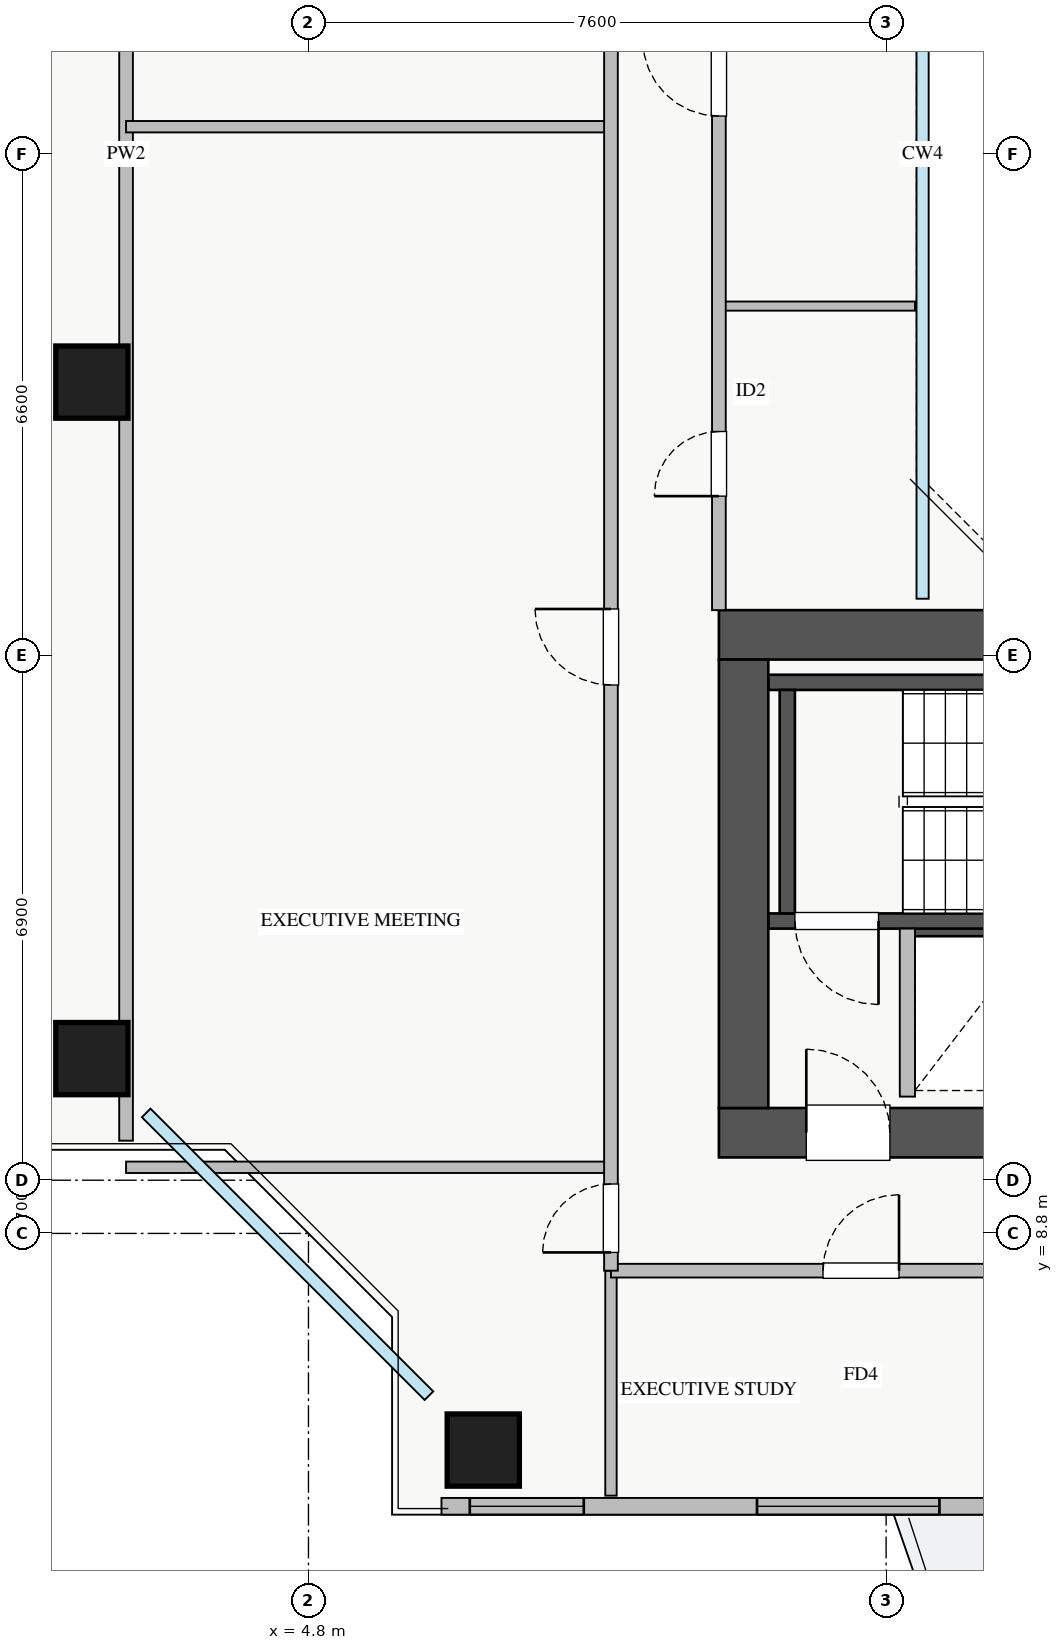
"""IFC4 building model, lengths in metres.
Left out: names, types, materials, properties, quantities, classifications, styles, units other than length and angle.
Written with IfcOpenShell. Run it as: python <this file> out.ifc"""

import sys

from ifc_helpers import new_model, si_unit, direction, frame, frame_2d, origin, origin_2d, place, context, subcontext, project, spatial, rectangle, extrude, source, transform, mapped, element, fill, save


model = new_model("IFC4")
c1 = context("Model", 3, precision=1e-05, world=origin(), true_north=direction((0.0, 1.0)))
c2 = subcontext(c1, "Body", "Model", "MODEL_VIEW")
j1 = project(units=[si_unit("LENGTHUNIT", "METRE"), si_unit("PLANEANGLEUNIT", "RADIAN")], contexts=[c1])
p1 = place(None, origin())
s1 = spatial("IfcSite", under=j1, at=p1, CompositionType="ELEMENT")
p2 = place(p1, origin())
s2 = spatial("IfcBuilding", under=s1, at=p2, CompositionType="ELEMENT")
p3 = place(p2, frame((0.0, 0.0, 176.25)))
s3 = spatial("IfcBuildingStorey", under=s2, at=p3, CompositionType="ELEMENT", Elevation=176.25)
p4 = place(p3, frame((12.68, 12.8, 0.0), z_axis=(0.0, 0.0, 1.0), x_axis=(1.0, 0.0, 0.0)))
e1 = element("IfcWall", 1, at=p4, inside=s3, PredefinedType="SHEAR", context=c2, shape_type="SweptSolid", body=[
    extrude(rectangle(XDim=1.94, YDim=0.18, at=frame_2d((0.97, 0.0))), origin(), (0.0, 0.0, 1.0), 3.07),
])
p5 = place(p3, frame((10.85, 12.91, 0.0), z_axis=(0.0, 0.0, 1.0), x_axis=(1.0, 0.0, 0.0)))
e2 = element("IfcWall", 2, at=p5, inside=s3, PredefinedType="SHEAR", context=c2, shape_type="SweptSolid", body=[
    extrude(rectangle(XDim=7.3, YDim=0.2, at=frame_2d((3.65, 0.0))), origin(), (0.0, 0.0, 1.0), 3.25),
])
p6 = place(p5, frame((0.35, 0.0, 0.0)))
e3 = element("IfcOpeningElement", 3, at=p6, cuts=e2, PredefinedType="OPENING", context=c2, shape_type="SweptSolid", body=[
    extrude(rectangle(XDim=1.1, YDim=2.05, at=frame_2d((0.55, 1.025))), frame((0.0, 0.11, 0.0), z_axis=(0.0, -1.0, 0.0), x_axis=(1.0, 0.0, 0.0)), (0.0, 0.0, 1.0), 0.22),
])
p7 = place(p3, frame((10.85, 16.05, 0.0), z_axis=(0.0, 0.0, 1.0), x_axis=(1.0, 0.0, 0.0)))
e4 = element("IfcWall", 4, at=p7, inside=s3, PredefinedType="SHEAR", context=c2, shape_type="SweptSolid", body=[
    extrude(rectangle(XDim=7.3, YDim=0.2, at=frame_2d((3.65, 0.0))), origin(), (0.0, 0.0, 1.0), 3.25),
])
p8 = place(p3, frame((11.1, 13.01, 0.0), z_axis=(0.0, 0.0, 1.0), x_axis=(0.0, 1.0, 0.0)))
e5 = element("IfcWall", 5, at=p8, inside=s3, PredefinedType="SHEAR", context=c2, shape_type="SweptSolid", body=[
    extrude(rectangle(XDim=2.94, YDim=0.2, at=frame_2d((1.47, 0.0))), origin(), (0.0, 0.0, 1.0), 3.25),
])
p9 = place(p3, frame((10.2, 10.125, 0.0), z_axis=(0.0, 0.0, 1.0), x_axis=(1.0, 0.0, 0.0)))
e6 = element("IfcWall", 6, at=p9, inside=s3, PredefinedType="SHEAR", context=c2, shape_type="SweptSolid", body=[
    extrude(rectangle(XDim=17.6, YDim=0.65, at=frame_2d((8.8, 0.0))), origin(), (0.0, 0.0, 1.0), 3.25),
])
p10 = place(p9, frame((1.15, 0.0, 0.0)))
e7 = element("IfcOpeningElement", 7, at=p10, cuts=e6, PredefinedType="OPENING", context=c2, shape_type="SweptSolid", body=[
    extrude(rectangle(XDim=1.1, YDim=2.05, at=frame_2d((0.55, 1.025))), frame((0.0, 0.335, 0.0), z_axis=(0.0, -1.0, 0.0), x_axis=(1.0, 0.0, 0.0)), (0.0, 0.0, 1.0), 0.67),
])
p11 = place(p9, frame((8.3, 0.0, 0.0)))
e8 = element("IfcOpeningElement", 8, at=p11, cuts=e6, PredefinedType="OPENING", context=c2, shape_type="SweptSolid", body=[
    extrude(rectangle(XDim=1.1, YDim=2.05, at=frame_2d((0.55, 1.025))), frame((0.0, 0.335, 0.0), z_axis=(0.0, -1.0, 0.0), x_axis=(1.0, 0.0, 0.0)), (0.0, 0.0, 1.0), 0.67),
])
p12 = place(p9, frame((4.9, 0.0, 0.0)))
e9 = element("IfcOpeningElement", 9, at=p12, cuts=e6, PredefinedType="OPENING", context=c2, shape_type="SweptSolid", body=[
    extrude(rectangle(XDim=1.1, YDim=2.05, at=frame_2d((0.55, 1.025))), frame((0.0, 0.335, 0.0), z_axis=(0.0, -1.0, 0.0), x_axis=(1.0, 0.0, 0.0)), (0.0, 0.0, 1.0), 0.67),
])
p13 = place(p9, frame((14.74, 0.0, 0.0)))
e10 = element("IfcOpeningElement", 10, at=p13, cuts=e6, PredefinedType="OPENING", context=c2, shape_type="SweptSolid", body=[
    extrude(rectangle(XDim=1.0, YDim=2.05, at=frame_2d((0.5, 1.025))), frame((0.0, 0.335, 0.0), z_axis=(0.0, -1.0, 0.0), x_axis=(1.0, 0.0, 0.0)), (0.0, 0.0, 1.0), 0.67),
])
p14 = place(p9, frame((11.67, 0.0, 0.0)))
e11 = element("IfcOpeningElement", 11, at=p14, cuts=e6, PredefinedType="OPENING", context=c2, shape_type="SweptSolid", body=[
    extrude(rectangle(XDim=1.0, YDim=2.05, at=frame_2d((0.5, 1.025))), frame((0.0, 0.335, 0.0), z_axis=(0.0, -1.0, 0.0), x_axis=(1.0, 0.0, 0.0)), (0.0, 0.0, 1.0), 0.67),
])
p15 = place(p3, frame((10.2, 16.675, 0.0), z_axis=(0.0, 0.0, 1.0), x_axis=(1.0, 0.0, 0.0)))
e12 = element("IfcWall", 12, at=p15, inside=s3, PredefinedType="SHEAR", context=c2, shape_type="SweptSolid", body=[
    extrude(rectangle(XDim=17.6, YDim=0.65, at=frame_2d((8.8, 0.0))), origin(), (0.0, 0.0, 1.0), 3.25),
])
p16 = place(p3, frame((10.525, 10.45, 0.0), z_axis=(0.0, 0.0, 1.0), x_axis=(0.0, 1.0, 0.0)))
e13 = element("IfcWall", 13, at=p16, inside=s3, PredefinedType="SHEAR", context=c2, shape_type="SweptSolid", body=[
    extrude(rectangle(XDim=5.9, YDim=0.65, at=frame_2d((2.95, 0.0))), origin(), (0.0, 0.0, 1.0), 3.25),
])
m1 = source(origin(), c2, "Body", "SweptSolid", [
    extrude(rectangle(XDim=0.95, YDim=0.95, at=origin_2d()), origin(), (0.0, 0.0, 1.0), 3.25),
])
for number, where, z_axis, x_axis in (
    (14, (7.1, 5.95, 0.0), (0.0, 0.0, 1.0), (1.0, 0.0, 0.0)),
    (15, (1.95, 20.0, 0.0), (0.0, 0.0, 1.0), (1.0, 0.0, 0.0)),
    (16, (1.95, 11.1, 0.0), (0.0, 0.0, 1.0), (1.0, 0.0, 0.0)),
):
    element("IfcColumn", number, at=place(p3, frame(where, z_axis=z_axis, x_axis=x_axis)), inside=s3, PredefinedType="COLUMN", context=c2, shape_type="MappedRepresentation", body=[
        mapped(m1, transform((0.0, 0.0, 0.0), x_axis=(1.0, 0.0, 0.0), y_axis=(0.0, 1.0, 0.0), z_axis=(0.0, 0.0, 1.0), scale=1.0)),
    ])
p17 = place(p3, frame((6.55, 5.21, 0.0), z_axis=(0.0, 0.0, 1.0), x_axis=(1.0, 0.0, 0.0)))
e17 = element("IfcWall", 17, at=p17, inside=s3, PredefinedType="STANDARD", context=c2, shape_type="SweptSolid", body=[
    extrude(rectangle(XDim=24.9, YDim=0.22, at=frame_2d((12.45, 0.0))), origin(), (0.0, 0.0, 1.0), 2.61),
])
p18 = place(p17, frame((13.3, 0.0, 0.0)))
e18 = element("IfcOpeningElement", 18, at=p18, cuts=e17, PredefinedType="OPENING", context=c2, shape_type="SweptSolid", body=[
    extrude(rectangle(XDim=1.2, YDim=2.1, at=frame_2d((0.6, 1.05))), frame((0.0, 0.12, 0.0), z_axis=(0.0, -1.0, 0.0), x_axis=(1.0, 0.0, 0.0)), (0.0, 0.0, 1.0), 0.24),
])
p19 = place(p17, frame((0.373, 0.0, 0.9)))
e19 = element("IfcOpeningElement", 19, at=p19, cuts=e17, PredefinedType="OPENING", context=c2, shape_type="SweptSolid", body=[
    extrude(rectangle(XDim=1.5, YDim=1.5, at=frame_2d((0.75, 0.75))), frame((0.0, 0.12, 0.0), z_axis=(0.0, -1.0, 0.0), x_axis=(1.0, 0.0, 0.0)), (0.0, 0.0, 1.0), 0.24),
])
p20 = place(p17, frame((9.78, 0.0, 0.9)))
e20 = element("IfcOpeningElement", 20, at=p20, cuts=e17, PredefinedType="OPENING", context=c2, shape_type="SweptSolid", body=[
    extrude(rectangle(XDim=1.8, YDim=1.5, at=frame_2d((0.9, 0.75))), frame((0.0, 0.12, 0.0), z_axis=(0.0, -1.0, 0.0), x_axis=(1.0, 0.0, 0.0)), (0.0, 0.0, 1.0), 0.24),
])
p21 = place(p17, frame((14.813, 0.0, 0.9)))
e21 = element("IfcOpeningElement", 21, at=p21, cuts=e17, PredefinedType="OPENING", context=c2, shape_type="SweptSolid", body=[
    extrude(rectangle(XDim=1.5, YDim=1.45, at=frame_2d((0.75, 0.725))), frame((0.0, 0.12, 0.0), z_axis=(0.0, -1.0, 0.0), x_axis=(1.0, 0.0, 0.0)), (0.0, 0.0, 1.0), 0.24),
])
p22 = place(p17, frame((20.738, 0.0, 0.9)))
e22 = element("IfcOpeningElement", 22, at=p22, cuts=e17, PredefinedType="OPENING", context=c2, shape_type="SweptSolid", body=[
    extrude(rectangle(XDim=2.1, YDim=1.48, at=frame_2d((1.05, 0.74))), frame((0.0, 0.12, 0.0), z_axis=(0.0, -1.0, 0.0), x_axis=(1.0, 0.0, 0.0)), (0.0, 0.0, 1.0), 0.24),
])
p23 = place(p17, frame((4.152, 0.0, 0.9)))
e23 = element("IfcOpeningElement", 23, at=p23, cuts=e17, PredefinedType="OPENING", context=c2, shape_type="SweptSolid", body=[
    extrude(rectangle(XDim=2.4, YDim=1.5, at=frame_2d((1.2, 0.75))), frame((0.0, 0.12, 0.0), z_axis=(0.0, -1.0, 0.0), x_axis=(1.0, 0.0, 0.0)), (0.0, 0.0, 1.0), 0.24),
])
p24 = place(p3, frame((12.68, 10.6, 0.0), z_axis=(0.0, 0.0, 1.0), x_axis=(0.0, 1.0, 0.0)))
e24 = element("IfcWall", 24, at=p24, inside=s3, PredefinedType="PARTITIONING", context=c2, shape_type="SweptSolid", body=[
    extrude(rectangle(XDim=2.21, YDim=0.2, at=frame_2d((1.105, 0.0))), origin(), (0.0, 0.0, 1.0), 3.07),
])
p25 = place(p3, frame((2.4, 10.02, 0.0), z_axis=(0.0, 0.0, 1.0), x_axis=(0.0, 1.0, 0.0)))
e25 = element("IfcWall", 25, at=p25, inside=s3, PredefinedType="PARTITIONING", context=c2, shape_type="SweptSolid", body=[
    extrude(rectangle(XDim=25.96, YDim=0.18, at=frame_2d((12.98, 0.0))), origin(), (0.0, 0.0, 1.0), 3.07),
])
p26 = place(p3, frame((8.78, 5.35, 0.0), z_axis=(0.0, 0.0, 1.0), x_axis=(0.0, 1.0, 0.0)))
e26 = element("IfcWall", 26, at=p26, inside=s3, PredefinedType="PARTITIONING", context=c2, shape_type="SweptSolid", body=[
    extrude(rectangle(XDim=2.96, YDim=0.15, at=frame_2d((1.48, 0.0))), origin(), (0.0, 0.0, 1.0), 3.07),
])
p27 = place(p3, frame((8.78, 8.31, 0.0), z_axis=(0.0, 0.0, 1.0), x_axis=(1.0, 0.0, 0.0)))
e27 = element("IfcWall", 27, at=p27, inside=s3, PredefinedType="PARTITIONING", context=c2, shape_type="SweptSolid", body=[
    extrude(rectangle(XDim=23.54, YDim=0.18, at=frame_2d((11.77, 0.0))), origin(), (0.0, 0.0, 1.0), 3.07),
])
p28 = place(p27, frame((2.79, 0.0, 0.0)))
e28 = element("IfcOpeningElement", 28, at=p28, cuts=e27, PredefinedType="OPENING", context=c2, shape_type="SweptSolid", body=[
    extrude(rectangle(XDim=1.0, YDim=2.05, at=frame_2d((0.5, 1.025))), frame((0.0, 0.1, 0.0), z_axis=(0.0, -1.0, 0.0), x_axis=(1.0, 0.0, 0.0)), (0.0, 0.0, 1.0), 0.2),
])
p29 = place(p27, frame((7.95, 0.0, 0.0)))
e29 = element("IfcOpeningElement", 29, at=p29, cuts=e27, PredefinedType="OPENING", context=c2, shape_type="SweptSolid", body=[
    extrude(rectangle(XDim=1.0, YDim=2.05, at=frame_2d((0.5, 1.025))), frame((0.0, 0.1, 0.0), z_axis=(0.0, -1.0, 0.0), x_axis=(1.0, 0.0, 0.0)), (0.0, 0.0, 1.0), 0.2),
])
p30 = place(p27, frame((13.36, 0.0, 0.0)))
e30 = element("IfcOpeningElement", 30, at=p30, cuts=e27, PredefinedType="OPENING", context=c2, shape_type="SweptSolid", body=[
    extrude(rectangle(XDim=1.0, YDim=2.05, at=frame_2d((0.5, 1.025))), frame((0.0, 0.1, 0.0), z_axis=(0.0, -1.0, 0.0), x_axis=(1.0, 0.0, 0.0)), (0.0, 0.0, 1.0), 0.2),
])
p31 = place(p27, frame((19.8, 0.0, 0.0)))
e31 = element("IfcOpeningElement", 31, at=p31, cuts=e27, PredefinedType="OPENING", context=c2, shape_type="SweptSolid", body=[
    extrude(rectangle(XDim=1.0, YDim=2.05, at=frame_2d((0.5, 1.025))), frame((0.0, 0.1, 0.0), z_axis=(0.0, -1.0, 0.0), x_axis=(1.0, 0.0, 0.0)), (0.0, 0.0, 1.0), 0.2),
])
for number, where, z_axis, x_axis in (
    (32, (2.4, 9.67, 0.0), (0.0, 0.0, 1.0), (1.0, 0.0, 0.0)),
    (33, (2.4, 23.36, 0.0), (0.0, 0.0, 1.0), (1.0, 0.0, 0.0)),
):
    element("IfcWall", number, at=place(p3, frame(where, z_axis=z_axis, x_axis=x_axis)), inside=s3, PredefinedType="PARTITIONING", context=c2, shape_type="SweptSolid", body=[
        extrude(rectangle(XDim=6.38, YDim=0.15, at=frame_2d((3.19, 0.0))), origin(), (0.0, 0.0, 1.0), 3.07),
    ])
p32 = place(p3, frame((8.78, 8.31, 0.0), z_axis=(0.0, 0.0, 1.0), x_axis=(0.0, 1.0, 0.0)))
e34 = element("IfcWall", 34, at=p32, inside=s3, PredefinedType="PARTITIONING", context=c2, shape_type="SweptSolid", body=[
    extrude(rectangle(XDim=29.34, YDim=0.18, at=frame_2d((14.67, 0.0))), origin(), (0.0, 0.0, 1.0), 3.07),
])
p33 = place(p32, frame((28.045, 0.0, 0.0)))
e35 = element("IfcOpeningElement", 35, at=p33, cuts=e34, PredefinedType="OPENING", context=c2, shape_type="SweptSolid", body=[
    extrude(rectangle(XDim=0.9, YDim=2.05, at=frame_2d((0.45, 1.025))), frame((0.0, 0.1, 0.0), z_axis=(0.0, -1.0, 0.0), x_axis=(1.0, 0.0, 0.0)), (0.0, 0.0, 1.0), 0.2),
])
p34 = place(p32, frame((0.24, 0.0, 0.0)))
e36 = element("IfcOpeningElement", 36, at=p34, cuts=e34, PredefinedType="OPENING", context=c2, shape_type="SweptSolid", body=[
    extrude(rectangle(XDim=0.9, YDim=2.05, at=frame_2d((0.45, 1.025))), frame((0.0, 0.1, 0.0), z_axis=(0.0, -1.0, 0.0), x_axis=(1.0, 0.0, 0.0)), (0.0, 0.0, 1.0), 0.2),
])
p35 = place(p32, frame((7.705, 0.0, 0.0)))
e37 = element("IfcOpeningElement", 37, at=p35, cuts=e34, PredefinedType="OPENING", context=c2, shape_type="SweptSolid", body=[
    extrude(rectangle(XDim=1.0, YDim=2.05, at=frame_2d((0.5, 1.025))), frame((0.0, 0.1, 0.0), z_axis=(0.0, -1.0, 0.0), x_axis=(1.0, 0.0, 0.0)), (0.0, 0.0, 1.0), 0.2),
])
p36 = place(p32, frame((17.39, 0.0, 0.0)))
e38 = element("IfcOpeningElement", 38, at=p36, cuts=e34, PredefinedType="OPENING", context=c2, shape_type="SweptSolid", body=[
    extrude(rectangle(XDim=1.0, YDim=2.05, at=frame_2d((0.5, 1.025))), frame((0.0, 0.1, 0.0), z_axis=(0.0, -1.0, 0.0), x_axis=(1.0, 0.0, 0.0)), (0.0, 0.0, 1.0), 0.2),
])
p37 = place(p3, frame((10.2, 21.0, 0.0), z_axis=(0.0, 0.0, 1.0), x_axis=(1.0, 0.0, 0.0)))
e39 = element("IfcWall", 39, at=p37, inside=s3, PredefinedType="PLUMBINGWALL", context=c2, shape_type="SweptSolid", body=[
    extrude(rectangle(XDim=2.58, YDim=0.12, at=frame_2d((1.29, 0.0))), origin(), (0.0, 0.0, 1.0), 3.07),
])
p38 = place(p3, frame((10.2, 17.0, 0.0), z_axis=(0.0, 0.0, 1.0), x_axis=(0.0, 1.0, 0.0)))
e40 = element("IfcWall", 40, at=p38, inside=s3, PredefinedType="PARTITIONING", context=c2, shape_type="SweptSolid", body=[
    extrude(rectangle(XDim=12.0, YDim=0.18, at=frame_2d((6.0, 0.0))), origin(), (0.0, 0.0, 1.0), 3.07),
])
p39 = place(p38, frame((1.5, 0.0, 0.0)))
e41 = element("IfcOpeningElement", 41, at=p39, cuts=e40, PredefinedType="OPENING", context=c2, shape_type="SweptSolid", body=[
    extrude(rectangle(XDim=0.85, YDim=2.05, at=frame_2d((0.425, 1.025))), frame((0.0, 0.1, 0.0), z_axis=(0.0, -1.0, 0.0), x_axis=(1.0, 0.0, 0.0)), (0.0, 0.0, 1.0), 0.2),
])
p40 = place(p38, frame((6.5, 0.0, 0.0)))
e42 = element("IfcOpeningElement", 42, at=p40, cuts=e40, PredefinedType="OPENING", context=c2, shape_type="SweptSolid", body=[
    extrude(rectangle(XDim=1.0, YDim=2.05, at=frame_2d((0.5, 1.025))), frame((0.0, 0.1, 0.0), z_axis=(0.0, -1.0, 0.0), x_axis=(1.0, 0.0, 0.0)), (0.0, 0.0, 1.0), 0.2),
])
m2 = source(origin(), c2, "Body", "SweptSolid", [
    extrude(rectangle(XDim=1.5, YDim=1.5, at=frame_2d((0.75, 0.75))), frame((0.0, 0.03, 0.0), z_axis=(0.0, -1.0, 0.0), x_axis=(1.0, 0.0, 0.0)), (0.0, 0.0, 1.0), 0.06),
])
p41 = place(p19, origin())
e43 = element("IfcWindow", 43, at=p41, inside=s3, PartitioningType="TRIPLE_PANEL_VERTICAL", PredefinedType="WINDOW", context=c2, shape_type="MappedRepresentation", body=[
    mapped(m2, transform((0.0, 0.0, 0.0), x_axis=(1.0, 0.0, 0.0), y_axis=(0.0, 1.0, 0.0), z_axis=(0.0, 0.0, 1.0), scale=1.0)),
])
fill(e19, e43)
m3 = source(origin(), c2, "Body", "SweptSolid", [
    extrude(rectangle(XDim=1.1, YDim=2.05, at=frame_2d((0.55, 1.025))), frame((0.0, 0.025, 0.0), z_axis=(0.0, -1.0, 0.0), x_axis=(1.0, 0.0, 0.0)), (0.0, 0.0, 1.0), 0.05),
])
p42 = place(p10, origin())
e44 = element("IfcDoor", 44, at=p42, inside=s3, OperationType="SINGLE_SWING_LEFT", PredefinedType="DOOR", context=c2, shape_type="MappedRepresentation", body=[
    mapped(m3, transform((0.0, 0.0, 0.0), x_axis=(1.0, 0.0, 0.0), y_axis=(0.0, 1.0, 0.0), z_axis=(0.0, 0.0, 1.0), scale=1.0)),
])
fill(e7, e44)
p43 = place(p6, frame((1.1, 0.0, 0.0), z_axis=(0.0, 0.0, 1.0), x_axis=(-1.0, 0.0, 0.0)))
e45 = element("IfcDoor", 45, at=p43, inside=s3, OperationType="SINGLE_SWING_RIGHT", PredefinedType="DOOR", context=c2, shape_type="MappedRepresentation", body=[
    mapped(m3, transform((0.0, 0.0, 0.0), x_axis=(1.0, 0.0, 0.0), y_axis=(0.0, 1.0, 0.0), z_axis=(0.0, 0.0, 1.0), scale=1.0)),
])
fill(e3, e45)
m4 = source(origin(), c2, "Body", "SweptSolid", [
    extrude(rectangle(XDim=1.0, YDim=2.05, at=frame_2d((0.5, 1.025))), frame((0.0, 0.025, 0.0), z_axis=(0.0, -1.0, 0.0), x_axis=(1.0, 0.0, 0.0)), (0.0, 0.0, 1.0), 0.05),
])
p44 = place(p28, origin())
e46 = element("IfcDoor", 46, at=p44, inside=s3, OperationType="SINGLE_SWING_RIGHT", PredefinedType="DOOR", context=c2, shape_type="MappedRepresentation", body=[
    mapped(m4, transform((0.0, 0.0, 0.0), x_axis=(1.0, 0.0, 0.0), y_axis=(0.0, 1.0, 0.0), z_axis=(0.0, 0.0, 1.0), scale=1.0)),
])
fill(e28, e46)
m5 = source(origin(), c2, "Body", "SweptSolid", [
    extrude(rectangle(XDim=0.9, YDim=2.05, at=frame_2d((0.45, 1.025))), frame((0.0, 0.025, 0.0), z_axis=(0.0, -1.0, 0.0), x_axis=(1.0, 0.0, 0.0)), (0.0, 0.0, 1.0), 0.05),
])
p45 = place(p34, origin())
e47 = element("IfcDoor", 47, at=p45, inside=s3, OperationType="SINGLE_SWING_LEFT", PredefinedType="DOOR", context=c2, shape_type="MappedRepresentation", body=[
    mapped(m5, transform((0.0, 0.0, 0.0), x_axis=(1.0, 0.0, 0.0), y_axis=(0.0, 1.0, 0.0), z_axis=(0.0, 0.0, 1.0), scale=1.0)),
])
fill(e36, e47)
p46 = place(p35, origin())
e48 = element("IfcDoor", 48, at=p46, inside=s3, OperationType="SINGLE_SWING_RIGHT", PredefinedType="DOOR", context=c2, shape_type="MappedRepresentation", body=[
    mapped(m4, transform((0.0, 0.0, 0.0), x_axis=(1.0, 0.0, 0.0), y_axis=(0.0, 1.0, 0.0), z_axis=(0.0, 0.0, 1.0), scale=1.0)),
])
fill(e37, e48)
m6 = source(origin(), c2, "Body", "SweptSolid", [
    extrude(rectangle(XDim=0.85, YDim=2.05, at=frame_2d((0.425, 1.025))), frame((0.0, 0.025, 0.0), z_axis=(0.0, -1.0, 0.0), x_axis=(1.0, 0.0, 0.0)), (0.0, 0.0, 1.0), 0.05),
])
p47 = place(p39, origin())
e49 = element("IfcDoor", 49, at=p47, inside=s3, OperationType="SINGLE_SWING_LEFT", PredefinedType="DOOR", context=c2, shape_type="MappedRepresentation", body=[
    mapped(m6, transform((0.0, 0.0, 0.0), x_axis=(1.0, 0.0, 0.0), y_axis=(0.0, 1.0, 0.0), z_axis=(0.0, 0.0, 1.0), scale=1.0)),
])
fill(e41, e49)
p48 = place(p40, origin())
e50 = element("IfcDoor", 50, at=p48, inside=s3, OperationType="SINGLE_SWING_RIGHT", PredefinedType="DOOR", context=c2, shape_type="MappedRepresentation", body=[
    mapped(m4, transform((0.0, 0.0, 0.0), x_axis=(1.0, 0.0, 0.0), y_axis=(0.0, 1.0, 0.0), z_axis=(0.0, 0.0, 1.0), scale=1.0)),
])
fill(e42, e50)
m7 = source(origin(), c2, "Body", "SweptSolid", [
    extrude(rectangle(XDim=2.4, YDim=1.5, at=frame_2d((1.2, 0.75))), frame((0.0, 0.03, 0.0), z_axis=(0.0, -1.0, 0.0), x_axis=(1.0, 0.0, 0.0)), (0.0, 0.0, 1.0), 0.06),
])
p49 = place(p23, origin())
e51 = element("IfcWindow", 51, at=p49, inside=s3, PartitioningType="TRIPLE_PANEL_VERTICAL", PredefinedType="WINDOW", context=c2, shape_type="MappedRepresentation", body=[
    mapped(m7, transform((0.0, 0.0, 0.0), x_axis=(1.0, 0.0, 0.0), y_axis=(0.0, 1.0, 0.0), z_axis=(0.0, 0.0, 1.0), scale=1.0)),
])
fill(e23, e51)
save(model, sys.argv[1])
